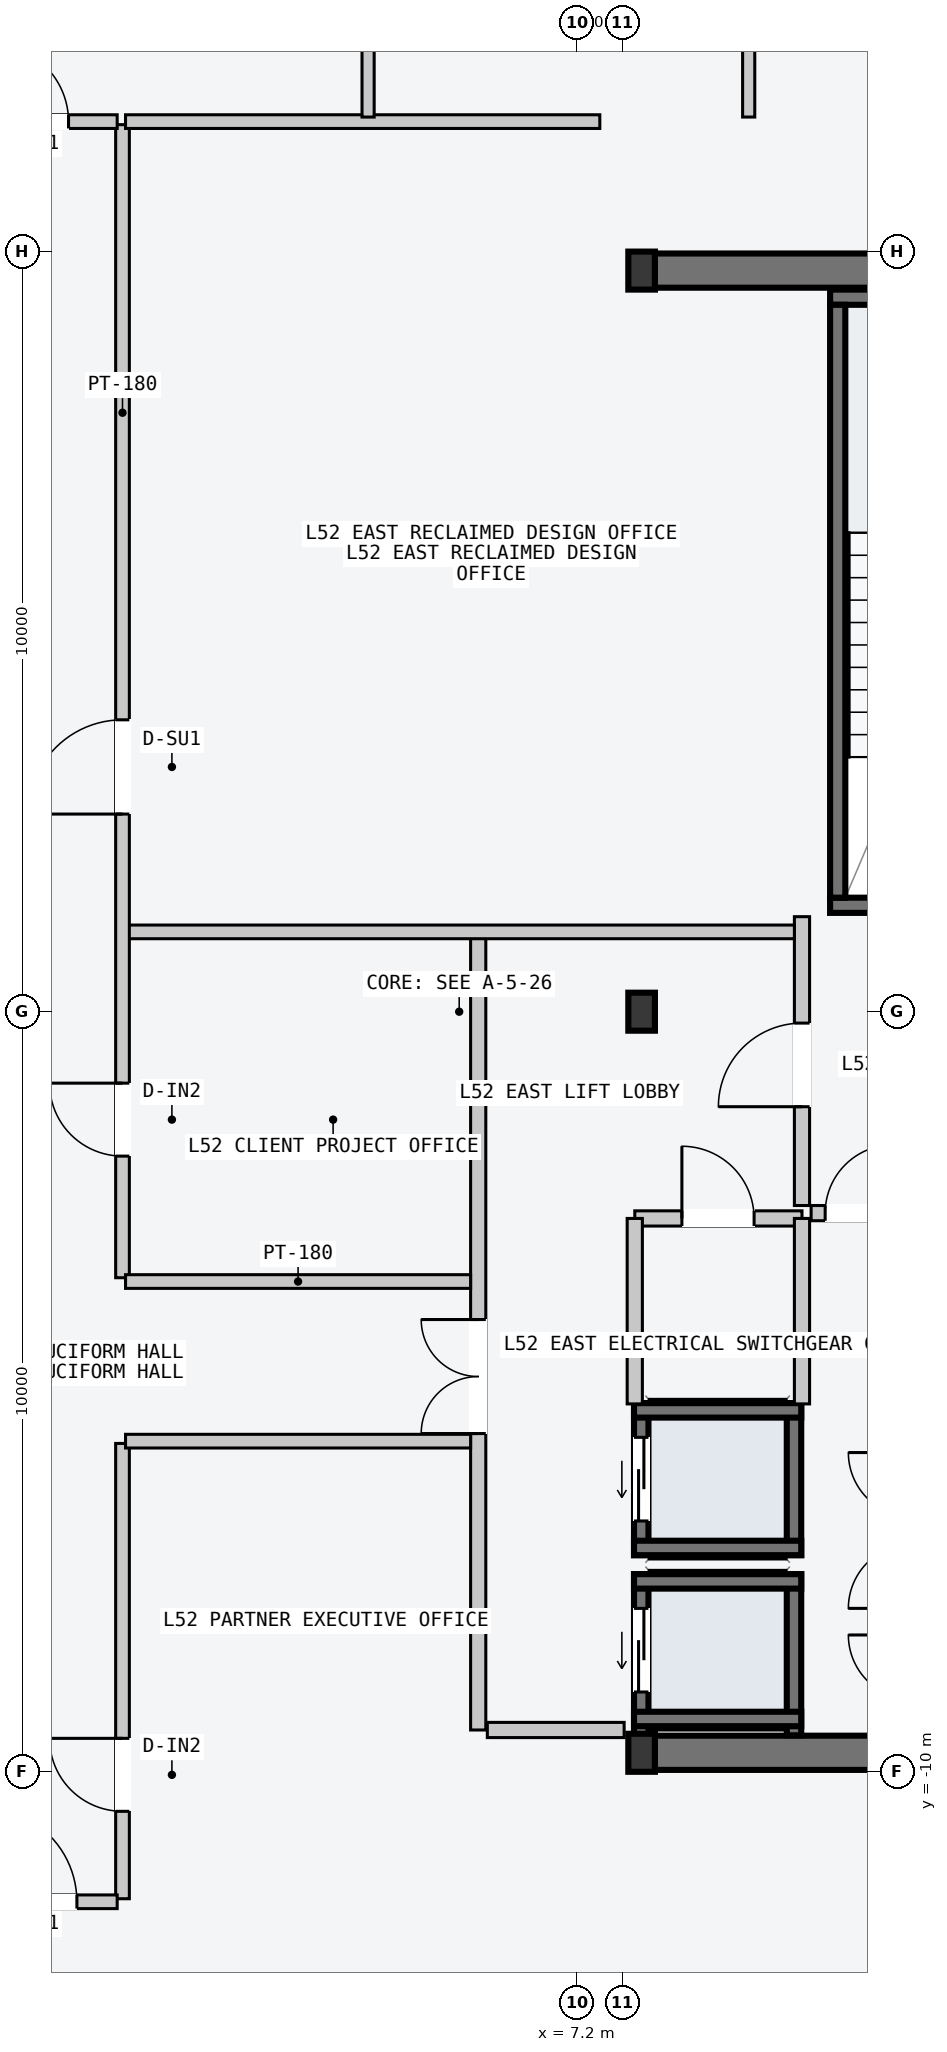
"""IFC4 building model, lengths in metres.
Left out: names, types, materials, properties, quantities, classifications, styles, units other than length and angle.
Written with IfcOpenShell. Run it as: python <this file> out.ifc"""

import sys

from ifc_helpers import new_model, si_unit, direction, frame, frame_2d, origin, origin_2d, place, context, subcontext, project, spatial, rectangle, i_section, extrude, element, fill, save


model = new_model("IFC4")
c1 = context("Model", 3, precision=1e-05, world=origin(), true_north=direction((0.0, 1.0)))
c2 = subcontext(c1, "Body", "Model", "MODEL_VIEW")
j1 = project(units=[si_unit("LENGTHUNIT", "METRE"), si_unit("PLANEANGLEUNIT", "RADIAN")], contexts=[c1])
p1 = place(None, origin())
s1 = spatial("IfcSite", under=j1, at=p1, CompositionType="ELEMENT")
p2 = place(p1, origin())
s2 = spatial("IfcBuilding", under=s1, at=p2, CompositionType="ELEMENT")
p3 = place(p2, frame((0.0, 0.0, 198.3)))
s3 = spatial("IfcBuildingStorey", under=s2, at=p3, CompositionType="ELEMENT", Elevation=198.3)
for number, where, z_axis, x_axis in (
    (1, (8.07, -9.75, -0.2), (0.0, 0.0, 1.0), (1.0, 0.0, 0.0)),
    (2, (8.07, 9.75, -0.2), (0.0, 0.0, 1.0), (1.0, 0.0, 0.0)),
):
    element("IfcWall", number, at=place(p3, frame(where, z_axis=z_axis, x_axis=x_axis)), inside=s3, PredefinedType="SHEAR", context=c2, shape_type="SweptSolid", body=[
        extrude(rectangle(XDim=6.46, YDim=0.45, at=frame_2d((3.23, 0.0))), origin(), (0.0, 0.0, 1.0), 3.6),
    ])
p4 = place(p3, frame((10.53, 1.4, -0.2), z_axis=(0.0, 0.0, 1.0), x_axis=(1.0, 0.0, 0.0)))
e3 = element("IfcWall", 3, at=p4, inside=s3, PredefinedType="SOLIDWALL", context=c2, shape_type="SweptSolid", body=[
    extrude(rectangle(XDim=3.72, YDim=0.2, at=frame_2d((1.86, 0.0))), origin(), (0.0, 0.0, 1.0), 3.6),
])
p5 = place(p4, frame((1.5, 0.0, 0.2)))
e4 = element("IfcOpeningElement", 4, at=p5, cuts=e3, PredefinedType="OPENING", context=c2, shape_type="SweptSolid", body=[
    extrude(rectangle(XDim=1.12, YDim=2.18, at=frame_2d((0.56, 1.09))), frame((0.0, 0.11, 0.0), z_axis=(0.0, -1.0, 0.0), x_axis=(1.0, 0.0, 0.0)), (0.0, 0.0, 1.0), 0.22),
])
p6 = place(p3, frame((10.53, 9.4, -0.2), z_axis=(0.0, 0.0, 1.0), x_axis=(1.0, 0.0, 0.0)))
e5 = element("IfcWall", 5, at=p6, inside=s3, PredefinedType="SOLIDWALL", context=c2, shape_type="SweptSolid", body=[
    extrude(rectangle(XDim=3.72, YDim=0.2, at=frame_2d((1.86, 0.0))), origin(), (0.0, 0.0, 1.0), 3.6),
])
p7 = place(p3, frame((10.63, 1.5, -0.2), z_axis=(0.0, 0.0, 1.0), x_axis=(0.0, 1.0, 0.0)))
e6 = element("IfcWall", 6, at=p7, inside=s3, PredefinedType="SOLIDWALL", context=c2, shape_type="SweptSolid", body=[
    extrude(rectangle(XDim=7.8, YDim=0.2, at=frame_2d((3.9, 0.0))), origin(), (0.0, 0.0, 1.0), 3.6),
])
for number, where, z_axis, x_axis in (
    (7, (8.05, -9.75, 0.0), (0.0, 0.0, 1.0), (1.0, 0.0, 0.0)),
    (8, (8.05, 0.0, 0.0), (0.0, 0.0, 1.0), (1.0, 0.0, 0.0)),
    (9, (8.05, 9.75, 0.0), (0.0, 0.0, 1.0), (1.0, 0.0, 0.0)),
):
    element("IfcColumn", number, at=place(p3, frame(where, z_axis=z_axis, x_axis=x_axis)), inside=s3, PredefinedType="COLUMN", context=c2, shape_type="SweptSolid", body=[
        extrude(i_section(OverallWidth=0.35, OverallDepth=0.5, WebThickness=0.02, FlangeThickness=0.032, at=origin_2d()), origin(), (0.0, 0.0, 1.0), 3.6),
    ])
p8 = place(p3, frame((8.045, -9.52, -0.2), z_axis=(0.0, 0.0, 1.0), x_axis=(0.0, 1.0, 0.0)))
e10 = element("IfcWall", 10, at=p8, inside=s3, PredefinedType="SOLIDWALL", context=c2, shape_type="SweptSolid", body=[
    extrude(rectangle(XDim=2.12, YDim=0.19, at=frame_2d((1.06, 0.0))), origin(), (0.0, 0.0, 1.0), 3.6),
])
p9 = place(p8, frame((0.57, 0.0, 0.2)))
e11 = element("IfcOpeningElement", 11, at=p9, cuts=e10, PredefinedType="OPENING", context=c2, shape_type="SweptSolid", body=[
    extrude(rectangle(XDim=1.1, YDim=2.2, at=frame_2d((0.55, 1.1))), frame((0.0, 0.105, 0.0), z_axis=(0.0, -1.0, 0.0), x_axis=(1.0, 0.0, 0.0)), (0.0, 0.0, 1.0), 0.21),
])
p10 = place(p3, frame((10.055, -9.52, -0.2), z_axis=(0.0, 0.0, 1.0), x_axis=(0.0, 1.0, 0.0)))
e12 = element("IfcWall", 12, at=p10, inside=s3, PredefinedType="SOLIDWALL", context=c2, shape_type="SweptSolid", body=[
    extrude(rectangle(XDim=2.12, YDim=0.19, at=frame_2d((1.06, 0.0))), origin(), (0.0, 0.0, 1.0), 3.6),
])
for number, where, z_axis, x_axis in (
    (13, (7.95, -7.495, -0.2), (0.0, 0.0, 1.0), (1.0, 0.0, 0.0)),
    (14, (7.95, -9.305, -0.2), (0.0, 0.0, 1.0), (1.0, 0.0, 0.0)),
):
    element("IfcWall", number, at=place(p3, frame(where, z_axis=z_axis, x_axis=x_axis)), inside=s3, PredefinedType="SOLIDWALL", context=c2, shape_type="SweptSolid", body=[
        extrude(rectangle(XDim=2.2, YDim=0.19, at=frame_2d((1.1, 0.0))), origin(), (0.0, 0.0, 1.0), 3.6),
    ])
p11 = place(p3, frame((8.045, -7.15, -0.2), z_axis=(0.0, 0.0, 1.0), x_axis=(0.0, 1.0, 0.0)))
e15 = element("IfcWall", 15, at=p11, inside=s3, PredefinedType="SOLIDWALL", context=c2, shape_type="SweptSolid", body=[
    extrude(rectangle(XDim=2.0, YDim=0.19, at=frame_2d((1.0, 0.0))), origin(), (0.0, 0.0, 1.0), 3.6),
])
p12 = place(p11, frame((0.45, 0.0, 0.2)))
e16 = element("IfcOpeningElement", 16, at=p12, cuts=e15, PredefinedType="OPENING", context=c2, shape_type="SweptSolid", body=[
    extrude(rectangle(XDim=1.1, YDim=2.2, at=frame_2d((0.55, 1.1))), frame((0.0, 0.105, 0.0), z_axis=(0.0, -1.0, 0.0), x_axis=(1.0, 0.0, 0.0)), (0.0, 0.0, 1.0), 0.21),
])
p13 = place(p3, frame((10.055, -7.15, -0.2), z_axis=(0.0, 0.0, 1.0), x_axis=(0.0, 1.0, 0.0)))
e17 = element("IfcWall", 17, at=p13, inside=s3, PredefinedType="SOLIDWALL", context=c2, shape_type="SweptSolid", body=[
    extrude(rectangle(XDim=2.0, YDim=0.19, at=frame_2d((1.0, 0.0))), origin(), (0.0, 0.0, 1.0), 3.6),
])
for number, where, z_axis, x_axis in (
    (18, (7.95, -5.245, -0.2), (0.0, 0.0, 1.0), (1.0, 0.0, 0.0)),
    (19, (7.95, -7.055, -0.2), (0.0, 0.0, 1.0), (1.0, 0.0, 0.0)),
):
    element("IfcWall", number, at=place(p3, frame(where, z_axis=z_axis, x_axis=x_axis)), inside=s3, PredefinedType="SOLIDWALL", context=c2, shape_type="SweptSolid", body=[
        extrude(rectangle(XDim=2.2, YDim=0.19, at=frame_2d((1.1, 0.0))), origin(), (0.0, 0.0, 1.0), 3.6),
    ])
p14 = place(p3, frame((5.9, -9.45, 0.0), z_axis=(0.0, 0.0, 1.0), x_axis=(0.0, 1.0, 0.0)))
e20 = element("IfcWall", 20, at=p14, inside=s3, PredefinedType="PARTITIONING", context=c2, shape_type="SweptSolid", body=[
    extrude(rectangle(XDim=10.5, YDim=0.2, at=frame_2d((5.25, 0.0))), origin(), (0.0, 0.0, 1.0), 3.4),
])
p15 = place(p14, frame((3.9, 0.0, 0.0)))
e21 = element("IfcOpeningElement", 21, at=p15, cuts=e20, PredefinedType="OPENING", context=c2, shape_type="SweptSolid", body=[
    extrude(rectangle(XDim=1.5, YDim=2.2, at=frame_2d((0.75, 1.1))), frame((0.0, 0.11, 0.0), z_axis=(0.0, -1.0, 0.0), x_axis=(1.0, 0.0, 0.0)), (0.0, 0.0, 1.0), 0.22),
])
p16 = place(p3, frame((6.02, -9.45, 0.0), z_axis=(0.0, 0.0, 1.0), x_axis=(1.0, 0.0, 0.0)))
e22 = element("IfcWall", 22, at=p16, inside=s3, PredefinedType="PARTITIONING", context=c2, shape_type="SweptSolid", body=[
    extrude(rectangle(XDim=1.8, YDim=0.2, at=frame_2d((0.9, 0.0))), origin(), (0.0, 0.0, 1.0), 3.4),
])
p17 = place(p3, frame((10.16, -2.55, 0.0), z_axis=(0.0, 0.0, 1.0), x_axis=(0.0, 1.0, 0.0)))
e23 = element("IfcWall", 23, at=p17, inside=s3, PredefinedType="PARTITIONING", context=c2, shape_type="SweptSolid", body=[
    extrude(rectangle(XDim=3.8, YDim=0.2, at=frame_2d((1.9, 0.0))), origin(), (0.0, 0.0, 1.0), 3.4),
])
p18 = place(p17, frame((1.3, 0.0, 0.0)))
e24 = element("IfcOpeningElement", 24, at=p18, cuts=e23, PredefinedType="OPENING", context=c2, shape_type="SweptSolid", body=[
    extrude(rectangle(XDim=1.1, YDim=2.15, at=frame_2d((0.55, 1.075))), frame((0.0, 0.11, 0.0), z_axis=(0.0, -1.0, 0.0), x_axis=(1.0, 0.0, 0.0)), (0.0, 0.0, 1.0), 0.22),
])
p19 = place(p3, frame((10.28, -2.65, 0.0), z_axis=(0.0, 0.0, 1.0), x_axis=(1.0, 0.0, 0.0)))
e25 = element("IfcWall", 25, at=p19, inside=s3, PredefinedType="PARTITIONING", context=c2, shape_type="SweptSolid", body=[
    extrude(rectangle(XDim=1.27, YDim=0.2, at=frame_2d((0.635, 0.0))), origin(), (0.0, 0.0, 1.0), 3.4),
])
p20 = place(p19, frame((0.185, 0.0, 0.0)))
e26 = element("IfcOpeningElement", 26, at=p20, cuts=e25, PredefinedType="OPENING", context=c2, shape_type="SweptSolid", body=[
    extrude(rectangle(XDim=0.9, YDim=2.15, at=frame_2d((0.45, 1.075))), frame((0.0, 0.11, 0.0), z_axis=(0.0, -1.0, 0.0), x_axis=(1.0, 0.0, 0.0)), (0.0, 0.0, 1.0), 0.22),
])
p21 = place(p3, frame((7.96, -2.72, 0.0), z_axis=(0.0, 0.0, 1.0), x_axis=(1.0, 0.0, 0.0)))
e27 = element("IfcWall", 27, at=p21, inside=s3, PredefinedType="PARTITIONING", context=c2, shape_type="SweptSolid", body=[
    extrude(rectangle(XDim=2.2, YDim=0.2, at=frame_2d((1.1, 0.0))), origin(), (0.0, 0.0, 1.0), 3.4),
])
p22 = place(p21, frame((0.62, 0.0, 0.0)))
e28 = element("IfcOpeningElement", 28, at=p22, cuts=e27, PredefinedType="OPENING", context=c2, shape_type="SweptSolid", body=[
    extrude(rectangle(XDim=0.95, YDim=2.1, at=frame_2d((0.475, 1.05))), frame((0.0, 0.11, 0.0), z_axis=(0.0, -1.0, 0.0), x_axis=(1.0, 0.0, 0.0)), (0.0, 0.0, 1.0), 0.22),
])
for number, where, z_axis, x_axis in (
    (29, (7.96, -5.16, 0.0), (0.0, 0.0, 1.0), (0.0, 1.0, 0.0)),
    (30, (10.16, -5.16, 0.0), (0.0, 0.0, 1.0), (0.0, 1.0, 0.0)),
):
    element("IfcWall", number, at=place(p3, frame(where, z_axis=z_axis, x_axis=x_axis)), inside=s3, PredefinedType="PARTITIONING", context=c2, shape_type="SweptSolid", body=[
        extrude(rectangle(XDim=2.44, YDim=0.2, at=frame_2d((1.22, 0.0))), origin(), (0.0, 0.0, 1.0), 3.4),
    ])
p23 = place(p3, frame((1.26, 1.05, 0.0), z_axis=(0.0, 0.0, 1.0), x_axis=(1.0, 0.0, 0.0)))
e31 = element("IfcWall", 31, at=p23, inside=s3, PredefinedType="PARTITIONING", context=c2, shape_type="SweptSolid", body=[
    extrude(rectangle(XDim=8.8, YDim=0.18, at=frame_2d((4.4, 0.0))), origin(), (0.0, 0.0, 1.0), 3.4),
])
p24 = place(p3, frame((1.22, -3.5, 0.0), z_axis=(0.0, 0.0, 1.0), x_axis=(0.0, 1.0, 0.0)))
e32 = element("IfcWall", 32, at=p24, inside=s3, PredefinedType="PARTITIONING", context=c2, shape_type="SweptSolid", body=[
    extrude(rectangle(XDim=15.17, YDim=0.18, at=frame_2d((7.585, 0.0))), origin(), (0.0, 0.0, 1.0), 3.4),
])
p25 = place(p24, frame((6.1, 0.0, 0.0)))
e33 = element("IfcOpeningElement", 33, at=p25, cuts=e32, PredefinedType="OPENING", context=c2, shape_type="SweptSolid", body=[
    extrude(rectangle(XDim=1.24, YDim=2.24, at=frame_2d((0.62, 1.12))), frame((0.0, 0.1, 0.0), z_axis=(0.0, -1.0, 0.0), x_axis=(1.0, 0.0, 0.0)), (0.0, 0.0, 1.0), 0.2),
])
p26 = place(p24, frame((1.6, 0.0, 0.0)))
e34 = element("IfcOpeningElement", 34, at=p26, cuts=e32, PredefinedType="OPENING", context=c2, shape_type="SweptSolid", body=[
    extrude(rectangle(XDim=0.96, YDim=2.18, at=frame_2d((0.48, 1.09))), frame((0.0, 0.1, 0.0), z_axis=(0.0, -1.0, 0.0), x_axis=(1.0, 0.0, 0.0)), (0.0, 0.0, 1.0), 0.2),
])
p27 = place(p3, frame((1.26, 11.71, 0.0), z_axis=(0.0, 0.0, 1.0), x_axis=(1.0, 0.0, 0.0)))
e35 = element("IfcWall", 35, at=p27, inside=s3, PredefinedType="PARTITIONING", context=c2, shape_type="SweptSolid", body=[
    extrude(rectangle(XDim=6.24, YDim=0.18, at=frame_2d((3.12, 0.0))), origin(), (0.0, 0.0, 1.0), 3.4),
])
p28 = place(p3, frame((1.26, -3.55, 0.0), z_axis=(0.0, 0.0, 1.0), x_axis=(1.0, 0.0, 0.0)))
e36 = element("IfcWall", 36, at=p28, inside=s3, PredefinedType="PARTITIONING", context=c2, shape_type="SweptSolid", body=[
    extrude(rectangle(XDim=4.54, YDim=0.18, at=frame_2d((2.27, 0.0))), origin(), (0.0, 0.0, 1.0), 3.4),
])
p29 = place(p3, frame((1.22, -11.67, 0.0), z_axis=(0.0, 0.0, 1.0), x_axis=(0.0, 1.0, 0.0)))
e37 = element("IfcWall", 37, at=p29, inside=s3, PredefinedType="PARTITIONING", context=c2, shape_type="SweptSolid", body=[
    extrude(rectangle(XDim=5.99, YDim=0.18, at=frame_2d((2.995, 0.0))), origin(), (0.0, 0.0, 1.0), 3.4),
])
p30 = place(p29, frame((1.15, 0.0, 0.0)))
e38 = element("IfcOpeningElement", 38, at=p30, cuts=e37, PredefinedType="OPENING", context=c2, shape_type="SweptSolid", body=[
    extrude(rectangle(XDim=0.96, YDim=2.18, at=frame_2d((0.48, 1.09))), frame((0.0, 0.1, 0.0), z_axis=(0.0, -1.0, 0.0), x_axis=(1.0, 0.0, 0.0)), (0.0, 0.0, 1.0), 0.2),
])
p31 = place(p3, frame((1.26, -5.65, 0.0), z_axis=(0.0, 0.0, 1.0), x_axis=(1.0, 0.0, 0.0)))
e39 = element("IfcWall", 39, at=p31, inside=s3, PredefinedType="PARTITIONING", context=c2, shape_type="SweptSolid", body=[
    extrude(rectangle(XDim=4.54, YDim=0.18, at=frame_2d((2.27, 0.0))), origin(), (0.0, 0.0, 1.0), 3.4),
])
p32 = place(p3, frame((4.451, 11.77, 0.0), z_axis=(0.0, 0.0, 1.0), x_axis=(0.0, 1.0, 0.0)))
e40 = element("IfcWall", 40, at=p32, inside=s3, PredefinedType="PARTITIONING", context=c2, shape_type="SweptSolid", body=[
    extrude(rectangle(XDim=6.79, YDim=0.16, at=frame_2d((3.395, 0.0))), origin(), (0.0, 0.0, 1.0), 3.4),
])
p33 = place(p32, frame((1.15, 0.0, 0.0)))
e41 = element("IfcOpeningElement", 41, at=p33, cuts=e40, PredefinedType="OPENING", context=c2, shape_type="SweptSolid", body=[
    extrude(rectangle(XDim=0.96, YDim=2.18, at=frame_2d((0.48, 1.09))), frame((0.0, 0.09, 0.0), z_axis=(0.0, -1.0, 0.0), x_axis=(1.0, 0.0, 0.0)), (0.0, 0.0, 1.0), 0.18),
])
p34 = place(p3, frame((9.459, 11.77, 0.0), z_axis=(0.0, 0.0, 1.0), x_axis=(0.0, 1.0, 0.0)))
e42 = element("IfcWall", 42, at=p34, inside=s3, PredefinedType="PARTITIONING", context=c2, shape_type="SweptSolid", body=[
    extrude(rectangle(XDim=6.79, YDim=0.16, at=frame_2d((3.395, 0.0))), origin(), (0.0, 0.0, 1.0), 3.4),
])
p35 = place(p34, frame((1.15, 0.0, 0.0)))
e43 = element("IfcOpeningElement", 43, at=p35, cuts=e42, PredefinedType="OPENING", context=c2, shape_type="SweptSolid", body=[
    extrude(rectangle(XDim=0.96, YDim=2.18, at=frame_2d((0.48, 1.09))), frame((0.0, 0.09, 0.0), z_axis=(0.0, -1.0, 0.0), x_axis=(1.0, 0.0, 0.0)), (0.0, 0.0, 1.0), 0.18),
])
p36 = place(p3, frame((-1.15, 11.71, 0.0), z_axis=(0.0, 0.0, 1.0), x_axis=(1.0, 0.0, 0.0)))
e44 = element("IfcWall", 44, at=p36, inside=s3, PredefinedType="PARTITIONING", context=c2, shape_type="SweptSolid", body=[
    extrude(rectangle(XDim=2.3, YDim=0.18, at=frame_2d((1.15, 0.0))), origin(), (0.0, 0.0, 1.0), 3.4),
])
p37 = place(p36, frame((0.64, 0.0, 0.0)))
e45 = element("IfcOpeningElement", 45, at=p37, cuts=e44, PredefinedType="OPENING", context=c2, shape_type="SweptSolid", body=[
    extrude(rectangle(XDim=1.02, YDim=2.2, at=frame_2d((0.51, 1.1))), frame((0.0, 0.1, 0.0), z_axis=(0.0, -1.0, 0.0), x_axis=(1.0, 0.0, 0.0)), (0.0, 0.0, 1.0), 0.2),
])
p38 = place(p3, frame((-1.15, -11.71, 0.0), z_axis=(0.0, 0.0, 1.0), x_axis=(1.0, 0.0, 0.0)))
e46 = element("IfcWall", 46, at=p38, inside=s3, PredefinedType="PARTITIONING", context=c2, shape_type="SweptSolid", body=[
    extrude(rectangle(XDim=2.3, YDim=0.18, at=frame_2d((1.15, 0.0))), origin(), (0.0, 0.0, 1.0), 3.4),
])
p39 = place(p38, frame((0.53, 0.0, 0.0)))
e47 = element("IfcOpeningElement", 47, at=p39, cuts=e46, PredefinedType="OPENING", context=c2, shape_type="SweptSolid", body=[
    extrude(rectangle(XDim=1.24, YDim=2.24, at=frame_2d((0.62, 1.12))), frame((0.0, 0.1, 0.0), z_axis=(0.0, -1.0, 0.0), x_axis=(1.0, 0.0, 0.0)), (0.0, 0.0, 1.0), 0.2),
])
p40 = place(p9, origin())
e48 = element("IfcDoor", 48, at=p40, inside=s3, OperationType="SLIDING_TO_LEFT", PredefinedType="DOOR", context=c2, shape_type="SweptSolid", body=[
    extrude(rectangle(XDim=1.1, YDim=2.2, at=frame_2d((0.55, 1.1))), frame((0.0, 0.025, 0.0), z_axis=(0.0, -1.0, 0.0), x_axis=(1.0, 0.0, 0.0)), (0.0, 0.0, 1.0), 0.05),
])
fill(e11, e48)
p41 = place(p12, origin())
e49 = element("IfcDoor", 49, at=p41, inside=s3, OperationType="SLIDING_TO_LEFT", PredefinedType="DOOR", context=c2, shape_type="SweptSolid", body=[
    extrude(rectangle(XDim=1.1, YDim=2.2, at=frame_2d((0.55, 1.1))), frame((0.0, 0.025, 0.0), z_axis=(0.0, -1.0, 0.0), x_axis=(1.0, 0.0, 0.0)), (0.0, 0.0, 1.0), 0.05),
])
fill(e16, e49)
p42 = place(p15, origin())
e50 = element("IfcDoor", 50, at=p42, inside=s3, OperationType="DOUBLE_DOOR_SINGLE_SWING", PredefinedType="DOOR", context=c2, shape_type="SweptSolid", body=[
    extrude(rectangle(XDim=1.5, YDim=2.2, at=frame_2d((0.75, 1.1))), frame((0.0, 0.025, 0.0), z_axis=(0.0, -1.0, 0.0), x_axis=(1.0, 0.0, 0.0)), (0.0, 0.0, 1.0), 0.05),
])
fill(e21, e50)
p43 = place(p18, origin())
e51 = element("IfcDoor", 51, at=p43, inside=s3, OperationType="SINGLE_SWING_LEFT", PredefinedType="DOOR", context=c2, shape_type="SweptSolid", body=[
    extrude(rectangle(XDim=1.1, YDim=2.15, at=frame_2d((0.55, 1.075))), frame((0.0, 0.025, 0.0), z_axis=(0.0, -1.0, 0.0), x_axis=(1.0, 0.0, 0.0)), (0.0, 0.0, 1.0), 0.05),
])
fill(e24, e51)
p44 = place(p20, origin())
e52 = element("IfcDoor", 52, at=p44, inside=s3, OperationType="SINGLE_SWING_RIGHT", PredefinedType="DOOR", context=c2, shape_type="SweptSolid", body=[
    extrude(rectangle(XDim=0.9, YDim=2.15, at=frame_2d((0.45, 1.075))), frame((0.0, 0.025, 0.0), z_axis=(0.0, -1.0, 0.0), x_axis=(1.0, 0.0, 0.0)), (0.0, 0.0, 1.0), 0.05),
])
fill(e26, e52)
p45 = place(p22, origin())
e53 = element("IfcDoor", 53, at=p45, inside=s3, OperationType="SINGLE_SWING_LEFT", PredefinedType="DOOR", context=c2, shape_type="SweptSolid", body=[
    extrude(rectangle(XDim=0.95, YDim=2.1, at=frame_2d((0.475, 1.05))), frame((0.0, 0.025, 0.0), z_axis=(0.0, -1.0, 0.0), x_axis=(1.0, 0.0, 0.0)), (0.0, 0.0, 1.0), 0.05),
])
fill(e28, e53)
p46 = place(p25, origin())
e54 = element("IfcDoor", 54, at=p46, inside=s3, OperationType="SINGLE_SWING_LEFT", PredefinedType="DOOR", context=c2, shape_type="SweptSolid", body=[
    extrude(rectangle(XDim=1.24, YDim=2.24, at=frame_2d((0.62, 1.12))), frame((0.0, 0.025, 0.0), z_axis=(0.0, -1.0, 0.0), x_axis=(1.0, 0.0, 0.0)), (0.0, 0.0, 1.0), 0.05),
])
fill(e33, e54)
p47 = place(p26, origin())
e55 = element("IfcDoor", 55, at=p47, inside=s3, OperationType="SINGLE_SWING_RIGHT", PredefinedType="DOOR", context=c2, shape_type="SweptSolid", body=[
    extrude(rectangle(XDim=0.96, YDim=2.18, at=frame_2d((0.48, 1.09))), frame((0.0, 0.025, 0.0), z_axis=(0.0, -1.0, 0.0), x_axis=(1.0, 0.0, 0.0)), (0.0, 0.0, 1.0), 0.05),
])
fill(e34, e55)
p48 = place(p30, origin())
e56 = element("IfcDoor", 56, at=p48, inside=s3, OperationType="SINGLE_SWING_RIGHT", PredefinedType="DOOR", context=c2, shape_type="SweptSolid", body=[
    extrude(rectangle(XDim=0.96, YDim=2.18, at=frame_2d((0.48, 1.09))), frame((0.0, 0.025, 0.0), z_axis=(0.0, -1.0, 0.0), x_axis=(1.0, 0.0, 0.0)), (0.0, 0.0, 1.0), 0.05),
])
fill(e38, e56)
p49 = place(p37, origin())
e57 = element("IfcDoor", 57, at=p49, inside=s3, OperationType="SINGLE_SWING_LEFT", PredefinedType="DOOR", context=c2, shape_type="SweptSolid", body=[
    extrude(rectangle(XDim=1.02, YDim=2.2, at=frame_2d((0.51, 1.1))), frame((0.0, 0.025, 0.0), z_axis=(0.0, -1.0, 0.0), x_axis=(1.0, 0.0, 0.0)), (0.0, 0.0, 1.0), 0.05),
])
fill(e45, e57)
p50 = place(p39, origin())
e58 = element("IfcDoor", 58, at=p50, inside=s3, OperationType="SINGLE_SWING_LEFT", PredefinedType="DOOR", context=c2, shape_type="SweptSolid", body=[
    extrude(rectangle(XDim=1.24, YDim=2.24, at=frame_2d((0.62, 1.12))), frame((0.0, 0.025, 0.0), z_axis=(0.0, -1.0, 0.0), x_axis=(1.0, 0.0, 0.0)), (0.0, 0.0, 1.0), 0.05),
])
fill(e47, e58)
save(model, sys.argv[1])
